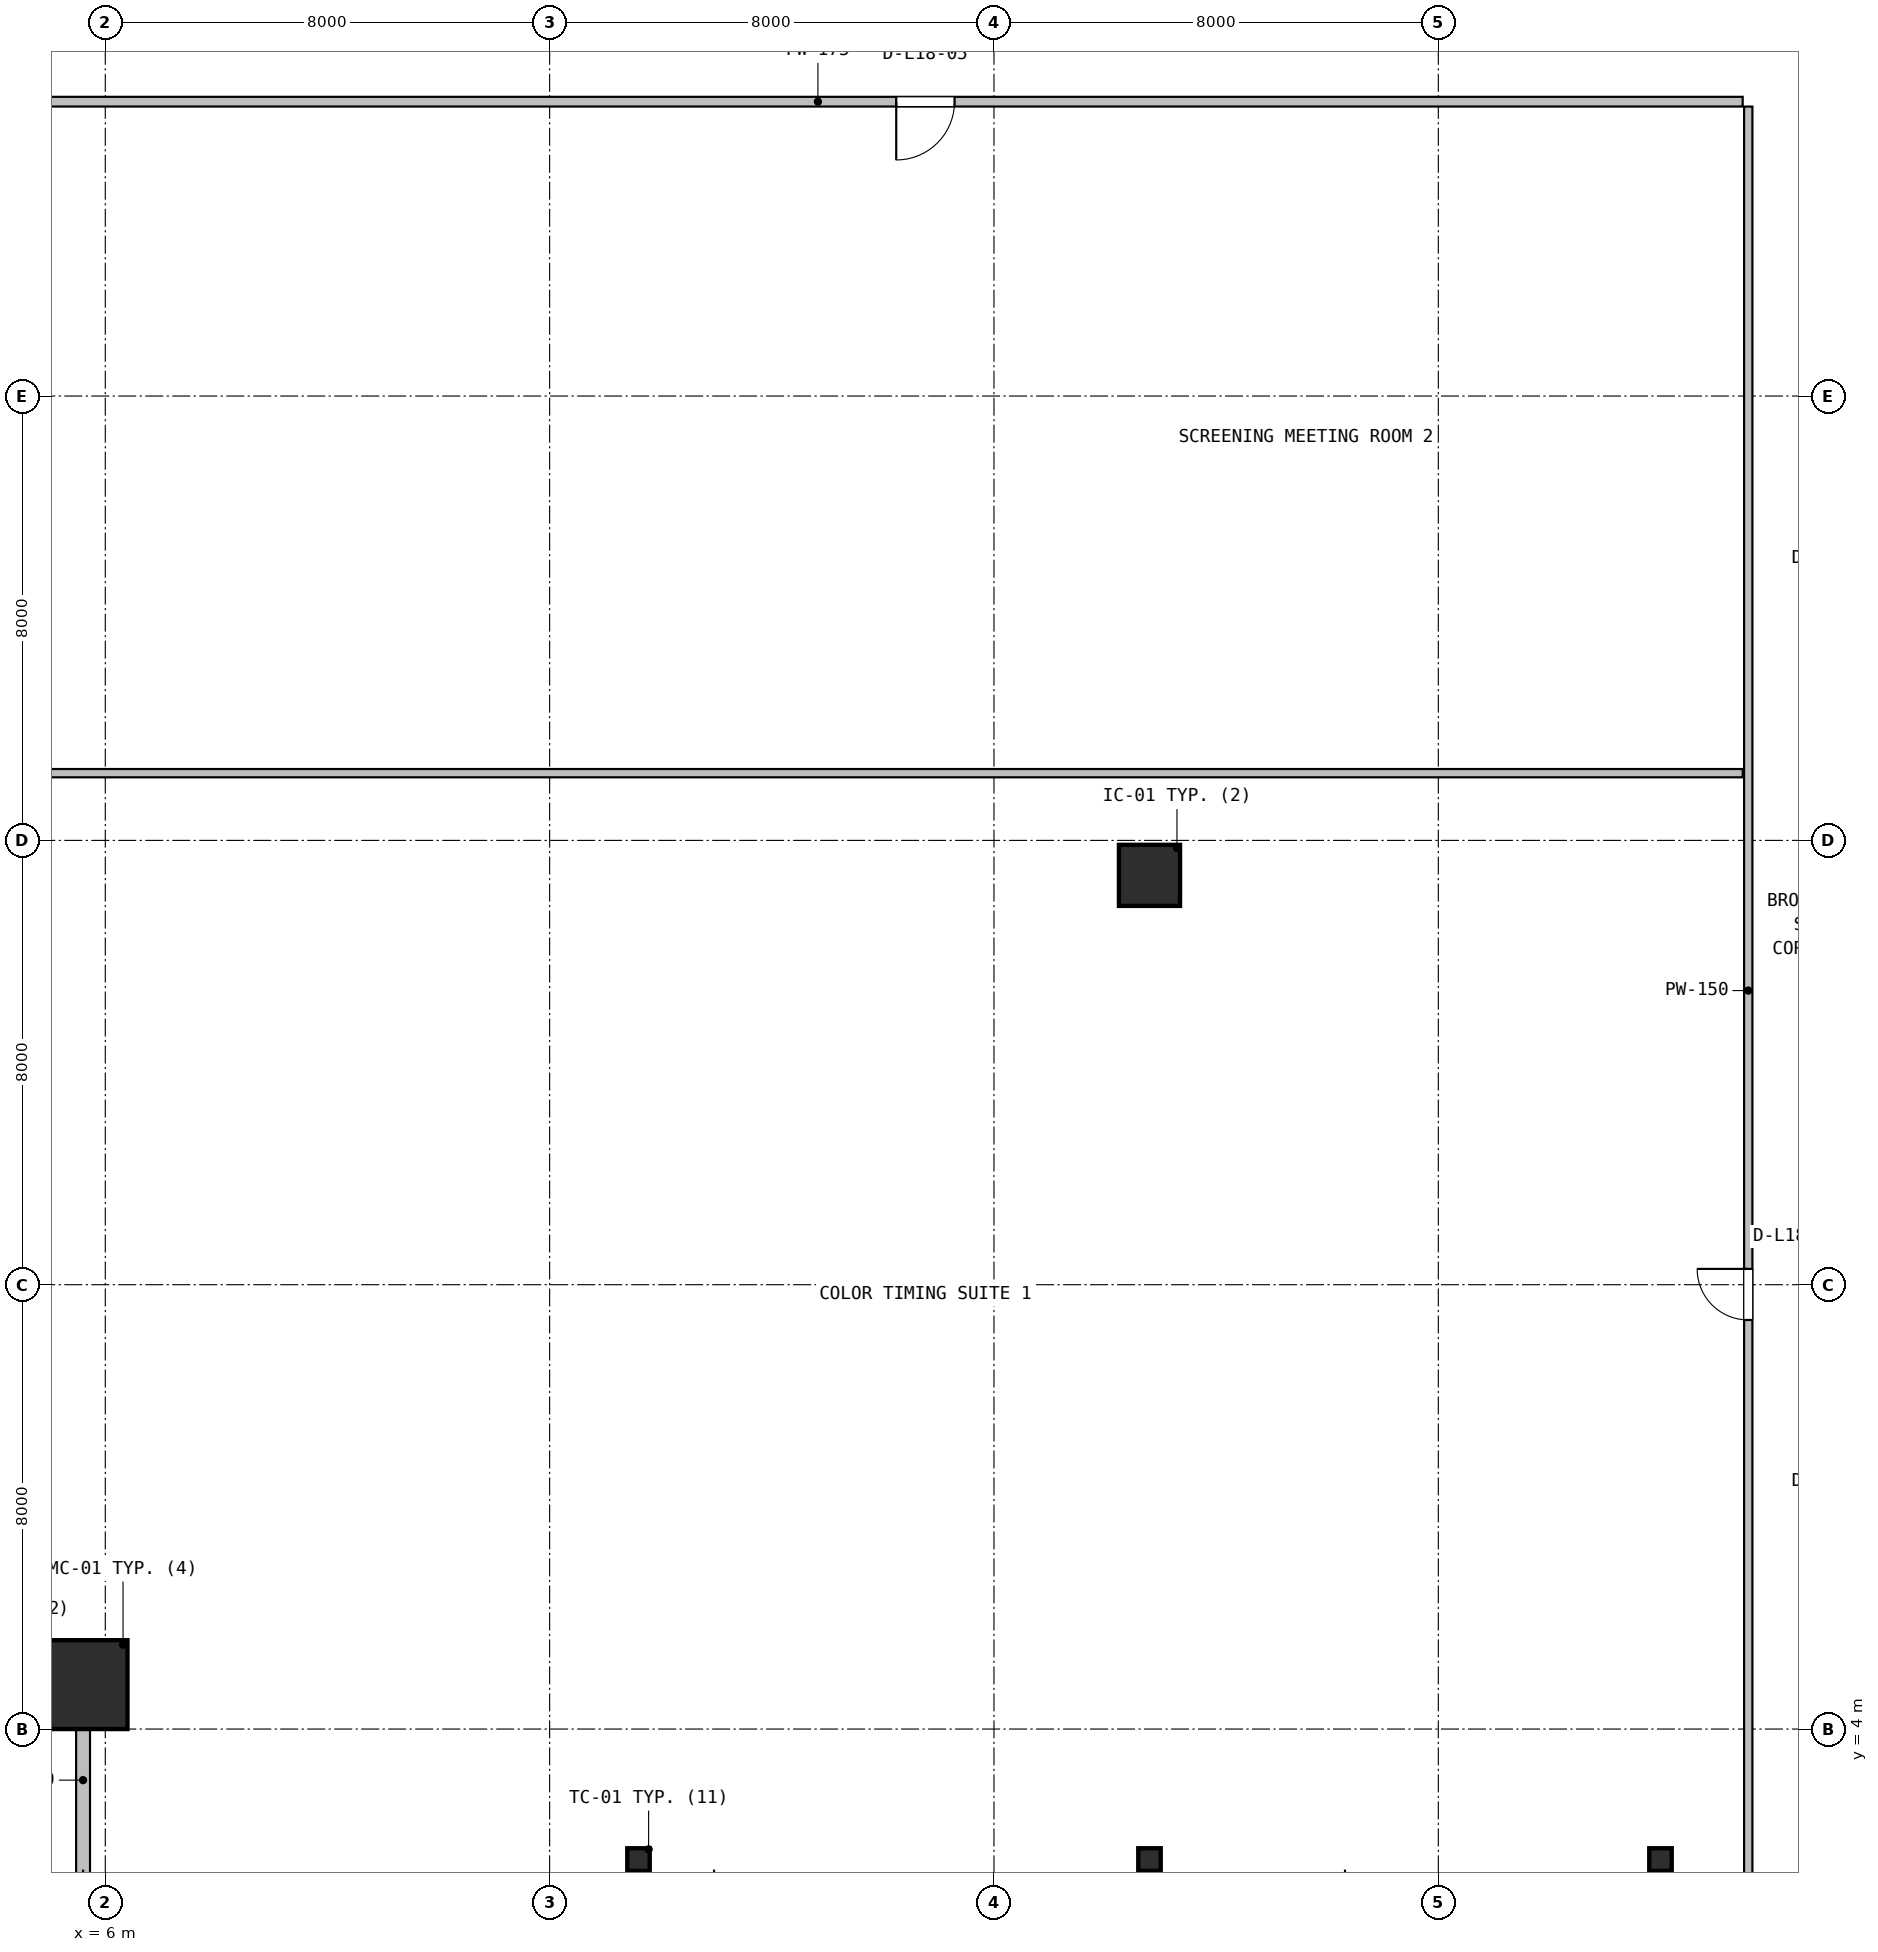
"""IFC4 building model, lengths in metres.
Left out: names, types, materials, properties, quantities, classifications, styles, units other than length and angle.
Written with IfcOpenShell. Run it as: python <this file> out.ifc"""

import sys

from ifc_helpers import new_model, si_unit, direction, frame, frame_2d, origin, origin_2d, place, context, subcontext, project, spatial, rectangle, hollow_rectangle, i_section, extrude, source, transform, mapped, element, fill, save


model = new_model("IFC4")
c1 = context("Model", 3, precision=1e-05, world=origin(), true_north=direction((0.0, 1.0)))
c2 = subcontext(c1, "Body", "Model", "MODEL_VIEW")
j1 = project(units=[si_unit("LENGTHUNIT", "METRE"), si_unit("PLANEANGLEUNIT", "RADIAN")], contexts=[c1])
p1 = place(None, origin())
s1 = spatial("IfcSite", under=j1, at=p1, CompositionType="ELEMENT")
p2 = place(p1, origin())
s2 = spatial("IfcBuilding", under=s1, at=p2, CompositionType="ELEMENT")
p3 = place(p2, frame((0.0, 0.0, 78.3)))
s3 = spatial("IfcBuildingStorey", under=s2, at=p3, CompositionType="ELEMENT", Elevation=78.3)
m1 = source(origin(), c2, "Body", "SweptSolid", [
    extrude(hollow_rectangle(XDim=1.6, YDim=1.6, WallThickness=0.06, at=origin_2d()), origin(), (0.0, 0.0, 1.0), 3.9),
])
p4 = place(p3, frame((5.6, 4.8, 0.0), z_axis=(0.0, 0.0, 1.0), x_axis=(1.0, 0.0, 0.0)))
e1 = element("IfcColumn", 1, at=p4, inside=s3, PredefinedType="COLUMN", context=c2, shape_type="MappedRepresentation", body=[
    mapped(m1, transform((0.0, 0.0, 0.0), x_axis=(1.0, 0.0, 0.0), y_axis=(0.0, 1.0, 0.0), z_axis=(0.0, 0.0, 1.0), scale=1.0)),
])
m2 = source(origin(), c2, "Body", "SweptSolid", [
    extrude(i_section(OverallWidth=0.404, OverallDepth=0.407, WebThickness=0.027, FlangeThickness=0.044, FilletRadius=0.018, at=origin_2d()), origin(), (0.0, 0.0, 1.0), 3.9),
])
for number, where, z_axis, x_axis in (
    (2, (15.6, 1.65, 0.0), (0.0, 0.0, 1.0), (1.0, 0.0, 0.0)),
    (3, (24.8, 1.65, 0.0), (0.0, 0.0, 1.0), (1.0, 0.0, 0.0)),
    (4, (34.0, 1.65, 0.0), (0.0, 0.0, 1.0), (1.0, 0.0, 0.0)),
):
    element("IfcColumn", number, at=place(p3, frame(where, z_axis=z_axis, x_axis=x_axis)), inside=s3, PredefinedType="COLUMN", context=c2, shape_type="MappedRepresentation", body=[
        mapped(m2, transform((0.0, 0.0, 0.0), x_axis=(1.0, 0.0, 0.0), y_axis=(0.0, 1.0, 0.0), z_axis=(0.0, 0.0, 1.0), scale=1.0)),
    ])
m3 = source(origin(), c2, "Body", "SweptSolid", [
    extrude(rectangle(XDim=1.1, YDim=1.1, at=origin_2d()), origin(), (0.0, 0.0, 1.0), 3.9),
])
p5 = place(p3, frame((24.8, 19.37, 0.0), z_axis=(0.0, 0.0, 1.0), x_axis=(1.0, 0.0, 0.0)))
e5 = element("IfcColumn", 5, at=p5, inside=s3, PredefinedType="COLUMN", context=c2, shape_type="MappedRepresentation", body=[
    mapped(m3, transform((0.0, 0.0, 0.0), x_axis=(1.0, 0.0, 0.0), y_axis=(0.0, 1.0, 0.0), z_axis=(0.0, 0.0, 1.0), scale=1.0)),
])
p6 = place(p3, frame((5.6, 1.28, 0.0), z_axis=(0.0, 0.0, 1.0), x_axis=(0.0, 1.0, 0.0)))
e6 = element("IfcWall", 6, at=p6, inside=s3, PredefinedType="SOLIDWALL", context=c2, shape_type="SweptSolid", body=[
    extrude(rectangle(XDim=3.6, YDim=0.25, at=frame_2d((1.8, 0.0))), origin(), (0.0, 0.0, 1.0), 3.138),
])
p7 = place(p3, frame((35.58, 1.38, 0.0), z_axis=(0.0, 0.0, 1.0), x_axis=(0.0, 1.0, 0.0)))
e7 = element("IfcWall", 7, at=p7, inside=s3, PredefinedType="PARTITIONING", context=c2, shape_type="SweptSolid", body=[
    extrude(rectangle(XDim=31.832, YDim=0.15, at=frame_2d((15.916, 0.0))), origin(), (0.0, 0.0, 1.0), 2.782),
])
p8 = place(p7, frame((9.985, 0.0, 0.0)))
e8 = element("IfcOpeningElement", 8, at=p8, cuts=e7, PredefinedType="OPENING", context=c2, shape_type="SweptSolid", body=[
    extrude(rectangle(XDim=0.92, YDim=2.08, at=frame_2d((0.46, 1.04))), frame((0.0, 0.085, 0.0), z_axis=(0.0, -1.0, 0.0), x_axis=(1.0, 0.0, 0.0)), (0.0, 0.0, 1.0), 0.17),
])
p9 = place(p3, frame((2.18, 21.21, 0.0), z_axis=(0.0, 0.0, 1.0), x_axis=(1.0, 0.0, 0.0)))
e9 = element("IfcWall", 9, at=p9, inside=s3, PredefinedType="PARTITIONING", context=c2, shape_type="SweptSolid", body=[
    extrude(rectangle(XDim=33.3, YDim=0.15, at=frame_2d((16.65, 0.0))), origin(), (0.0, 0.0, 1.0), 2.782),
])
p10 = place(p3, frame((2.18, 33.3, 0.0), z_axis=(0.0, 0.0, 1.0), x_axis=(1.0, 0.0, 0.0)))
e10 = element("IfcWall", 10, at=p10, inside=s3, PredefinedType="PARTITIONING", context=c2, shape_type="SweptSolid", body=[
    extrude(rectangle(XDim=33.3, YDim=0.175, at=frame_2d((16.65, 0.0))), origin(), (0.0, 0.0, 1.0), 2.782),
])
p11 = place(p10, frame((18.06, 0.0, 0.0)))
e11 = element("IfcOpeningElement", 11, at=p11, cuts=e10, PredefinedType="OPENING", context=c2, shape_type="SweptSolid", body=[
    extrude(rectangle(XDim=1.05, YDim=2.1, at=frame_2d((0.525, 1.05))), frame((0.0, 0.098, 0.0), z_axis=(0.0, -1.0, 0.0), x_axis=(1.0, 0.0, 0.0)), (0.0, 0.0, 1.0), 0.195),
])
m4 = source(origin(), c2, "Body", "SweptSolid", [
    extrude(rectangle(XDim=0.92, YDim=2.08, at=frame_2d((0.46, 1.04))), frame((0.0, 0.025, 0.0), z_axis=(0.0, -1.0, 0.0), x_axis=(1.0, 0.0, 0.0)), (0.0, 0.0, 1.0), 0.05),
])
p12 = place(p8, origin())
e12 = element("IfcDoor", 12, at=p12, inside=s3, OperationType="SINGLE_SWING_RIGHT", PredefinedType="DOOR", context=c2, shape_type="MappedRepresentation", body=[
    mapped(m4, transform((0.0, 0.0, 0.0), x_axis=(1.0, 0.0, 0.0), y_axis=(0.0, 1.0, 0.0), z_axis=(0.0, 0.0, 1.0), scale=1.0)),
])
fill(e8, e12)
m5 = source(origin(), c2, "Body", "SweptSolid", [
    extrude(rectangle(XDim=1.05, YDim=2.1, at=frame_2d((0.525, 1.05))), frame((0.0, 0.025, 0.0), z_axis=(0.0, -1.0, 0.0), x_axis=(1.0, 0.0, 0.0)), (0.0, 0.0, 1.0), 0.05),
])
p13 = place(p11, frame((1.05, 0.0, 0.0), z_axis=(0.0, 0.0, 1.0), x_axis=(-1.0, 0.0, 0.0)))
e13 = element("IfcDoor", 13, at=p13, inside=s3, OperationType="SINGLE_SWING_LEFT", PredefinedType="DOOR", context=c2, shape_type="MappedRepresentation", body=[
    mapped(m5, transform((0.0, 0.0, 0.0), x_axis=(1.0, 0.0, 0.0), y_axis=(0.0, 1.0, 0.0), z_axis=(0.0, 0.0, 1.0), scale=1.0)),
])
fill(e11, e13)
save(model, sys.argv[1])
